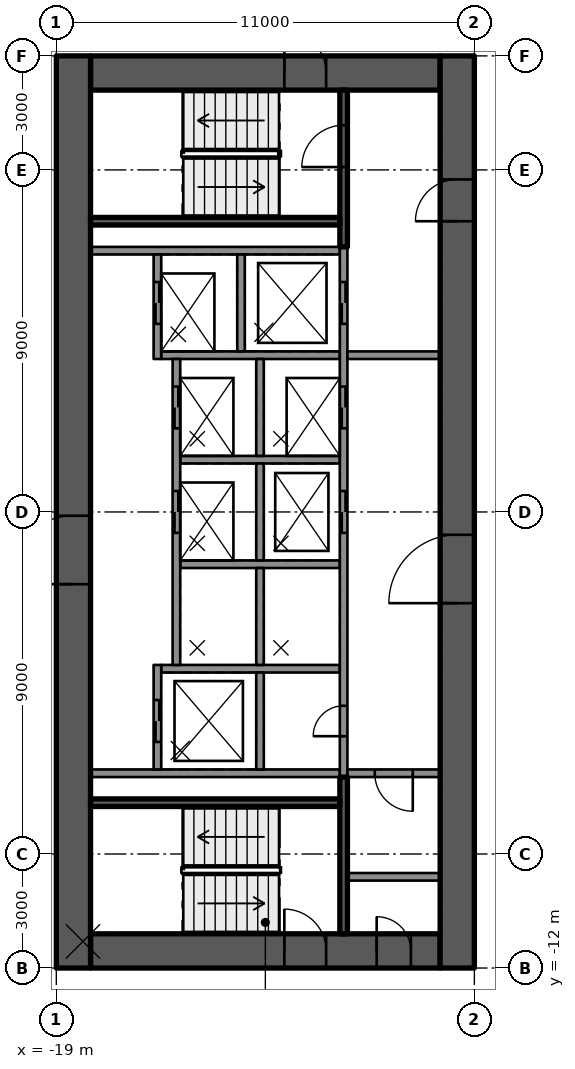
"""IFC4 building model, lengths in metres.
Left out: names, types, materials, properties, quantities, classifications, styles, units other than length and angle.
Written with IfcOpenShell. Run it as: python <this file> out.ifc"""

import sys

from ifc_helpers import new_model, si_unit, direction, frame, frame_2d, origin, place, context, subcontext, project, spatial, rectangle, extrude, element, fill, save


model = new_model("IFC4")
c1 = context("Model", 3, precision=1e-05, world=origin(), true_north=direction((0.0, 1.0)))
c2 = subcontext(c1, "Body", "Model", "MODEL_VIEW")
j1 = project(units=[si_unit("LENGTHUNIT", "METRE"), si_unit("PLANEANGLEUNIT", "RADIAN")], contexts=[c1])
p1 = place(None, origin())
s1 = spatial("IfcSite", under=j1, at=p1, CompositionType="ELEMENT")
p2 = place(p1, origin())
s2 = spatial("IfcBuilding", under=s1, at=p2, CompositionType="ELEMENT")
p3 = place(p2, frame((0.0, 0.0, 91.2)))
s3 = spatial("IfcBuildingStorey", under=s2, at=p3, CompositionType="ELEMENT", Elevation=91.2)
p4 = place(p3, frame((-18.1, 11.55, 0.0), z_axis=(0.0, 0.0, 1.0), x_axis=(1.0, 0.0, 0.0)))
e1 = element("IfcWall", 1, at=p4, inside=s3, PredefinedType="SHEAR", context=c2, shape_type="SweptSolid", body=[
    extrude(rectangle(XDim=9.2, YDim=0.9, at=frame_2d((4.6, 0.0))), origin(), (0.0, 0.0, 1.0), 3.5),
])
p5 = place(p4, frame((5.1, 0.0, 0.0)))
e2 = element("IfcOpeningElement", 2, at=p5, cuts=e1, PredefinedType="OPENING", context=c2, shape_type="SweptSolid", body=[
    extrude(rectangle(XDim=1.1, YDim=2.1, at=frame_2d((0.55, 1.05))), frame((0.0, 0.46, 0.0), z_axis=(0.0, -1.0, 0.0), x_axis=(1.0, 0.0, 0.0)), (0.0, 0.0, 1.0), 0.92),
])
p6 = place(p3, frame((-18.1, -11.55, 0.0), z_axis=(0.0, 0.0, 1.0), x_axis=(1.0, 0.0, 0.0)))
e3 = element("IfcWall", 3, at=p6, inside=s3, PredefinedType="SHEAR", context=c2, shape_type="SweptSolid", body=[
    extrude(rectangle(XDim=9.2, YDim=0.9, at=frame_2d((4.6, 0.0))), origin(), (0.0, 0.0, 1.0), 3.5),
])
p7 = place(p6, frame((5.1, 0.0, 0.0)))
e4 = element("IfcOpeningElement", 4, at=p7, cuts=e3, PredefinedType="OPENING", context=c2, shape_type="SweptSolid", body=[
    extrude(rectangle(XDim=1.1, YDim=2.1, at=frame_2d((0.55, 1.05))), frame((0.0, 0.46, 0.0), z_axis=(0.0, -1.0, 0.0), x_axis=(1.0, 0.0, 0.0)), (0.0, 0.0, 1.0), 0.92),
])
p8 = place(p6, frame((7.53, 0.0, 0.0)))
e5 = element("IfcOpeningElement", 5, at=p8, cuts=e3, PredefinedType="OPENING", context=c2, shape_type="SweptSolid", body=[
    extrude(rectangle(XDim=0.9, YDim=2.1, at=frame_2d((0.45, 1.05))), frame((0.0, 0.46, 0.0), z_axis=(0.0, -1.0, 0.0), x_axis=(1.0, 0.0, 0.0)), (0.0, 0.0, 1.0), 0.92),
])
p9 = place(p3, frame((-18.55, -12.0, 0.0), z_axis=(0.0, 0.0, 1.0), x_axis=(0.0, 1.0, 0.0)))
e6 = element("IfcWall", 6, at=p9, inside=s3, PredefinedType="SHEAR", context=c2, shape_type="SweptSolid", body=[
    extrude(rectangle(XDim=24.0, YDim=0.9, at=frame_2d((12.0, 0.0))), origin(), (0.0, 0.0, 1.0), 3.5),
])
p10 = place(p9, frame((10.1, 0.0, 0.0)))
e7 = element("IfcOpeningElement", 7, at=p10, cuts=e6, PredefinedType="OPENING", context=c2, shape_type="SweptSolid", body=[
    extrude(rectangle(XDim=1.8, YDim=2.1, at=frame_2d((0.9, 1.05))), frame((0.0, 0.46, 0.0), z_axis=(0.0, -1.0, 0.0), x_axis=(1.0, 0.0, 0.0)), (0.0, 0.0, 1.0), 0.92),
])
p11 = place(p3, frame((-8.45, -12.0, 0.0), z_axis=(0.0, 0.0, 1.0), x_axis=(0.0, 1.0, 0.0)))
e8 = element("IfcWall", 8, at=p11, inside=s3, PredefinedType="SHEAR", context=c2, shape_type="SweptSolid", body=[
    extrude(rectangle(XDim=24.0, YDim=0.9, at=frame_2d((12.0, 0.0))), origin(), (0.0, 0.0, 1.0), 3.5),
])
p12 = place(p11, frame((9.6, 0.0, 0.0)))
e9 = element("IfcOpeningElement", 9, at=p12, cuts=e8, PredefinedType="OPENING", context=c2, shape_type="SweptSolid", body=[
    extrude(rectangle(XDim=1.8, YDim=2.1, at=frame_2d((0.9, 1.05))), frame((0.0, 0.46, 0.0), z_axis=(0.0, -1.0, 0.0), x_axis=(1.0, 0.0, 0.0)), (0.0, 0.0, 1.0), 0.92),
])
p13 = place(p11, frame((19.65, 0.0, 0.0)))
e10 = element("IfcOpeningElement", 10, at=p13, cuts=e8, PredefinedType="OPENING", context=c2, shape_type="SweptSolid", body=[
    extrude(rectangle(XDim=1.1, YDim=2.1, at=frame_2d((0.55, 1.05))), frame((0.0, 0.46, 0.0), z_axis=(0.0, -1.0, 0.0), x_axis=(1.0, 0.0, 0.0)), (0.0, 0.0, 1.0), 0.92),
])
for number, where, z_axis, x_axis in (
    (11, (-11.54, 6.875, 0.0), (0.0, 0.0, 1.0), (-1.0, 0.0, 0.0)),
    (12, (-11.54, -6.875, 0.0), (0.0, 0.0, 1.0), (-1.0, 0.0, 0.0)),
):
    element("IfcWall", number, at=place(p3, frame(where, z_axis=z_axis, x_axis=x_axis)), inside=s3, PredefinedType="SOLIDWALL", context=c2, shape_type="SweptSolid", body=[
        extrude(rectangle(XDim=6.56, YDim=0.2, at=frame_2d((3.28, 0.0))), origin(), (0.0, 0.0, 1.0), 3.09),
    ])
p14 = place(p3, frame((-11.54, -4.125, 0.0), z_axis=(0.0, 0.0, 1.0), x_axis=(-1.0, 0.0, 0.0)))
e13 = element("IfcWall", 13, at=p14, inside=s3, PredefinedType="SOLIDWALL", context=c2, shape_type="SweptSolid", body=[
    extrude(rectangle(XDim=4.7, YDim=0.2, at=frame_2d((2.35, 0.0))), origin(), (0.0, 0.0, 1.0), 3.09),
])
for number, where, z_axis, x_axis in (
    (14, (-11.54, -1.375, 0.0), (0.0, 0.0, 1.0), (-1.0, 0.0, 0.0)),
    (15, (-11.54, 1.375, 0.0), (0.0, 0.0, 1.0), (-1.0, 0.0, 0.0)),
):
    element("IfcWall", number, at=place(p3, frame(where, z_axis=z_axis, x_axis=x_axis)), inside=s3, PredefinedType="SOLIDWALL", context=c2, shape_type="SweptSolid", body=[
        extrude(rectangle(XDim=4.2, YDim=0.2, at=frame_2d((2.1, 0.0))), origin(), (0.0, 0.0, 1.0), 3.09),
    ])
p15 = place(p3, frame((-11.54, 4.125, 0.0), z_axis=(0.0, 0.0, 1.0), x_axis=(-1.0, 0.0, 0.0)))
e16 = element("IfcWall", 16, at=p15, inside=s3, PredefinedType="SOLIDWALL", context=c2, shape_type="SweptSolid", body=[
    extrude(rectangle(XDim=4.7, YDim=0.2, at=frame_2d((2.35, 0.0))), origin(), (0.0, 0.0, 1.0), 3.09),
])
p16 = place(p3, frame((-11.44, -6.975, 0.0), z_axis=(0.0, 0.0, 1.0), x_axis=(0.0, 1.0, 0.0)))
e17 = element("IfcWall", 17, at=p16, inside=s3, PredefinedType="SOLIDWALL", context=c2, shape_type="SweptSolid", body=[
    extrude(rectangle(XDim=13.95, YDim=0.2, at=frame_2d((6.975, 0.0))), origin(), (0.0, 0.0, 1.0), 3.09),
])
p17 = place(p16, frame((6.425, 0.0, 0.0)))
e18 = element("IfcOpeningElement", 18, at=p17, cuts=e17, PredefinedType="OPENING", context=c2, shape_type="SweptSolid", body=[
    extrude(rectangle(XDim=1.1, YDim=2.1, at=frame_2d((0.55, 1.05))), frame((0.0, 0.11, 0.0), z_axis=(0.0, -1.0, 0.0), x_axis=(1.0, 0.0, 0.0)), (0.0, 0.0, 1.0), 0.22),
])
p18 = place(p16, frame((9.175, 0.0, 0.0)))
e19 = element("IfcOpeningElement", 19, at=p18, cuts=e17, PredefinedType="OPENING", context=c2, shape_type="SweptSolid", body=[
    extrude(rectangle(XDim=1.1, YDim=2.1, at=frame_2d((0.55, 1.05))), frame((0.0, 0.11, 0.0), z_axis=(0.0, -1.0, 0.0), x_axis=(1.0, 0.0, 0.0)), (0.0, 0.0, 1.0), 0.22),
])
p19 = place(p16, frame((11.925, 0.0, 0.0)))
e20 = element("IfcOpeningElement", 20, at=p19, cuts=e17, PredefinedType="OPENING", context=c2, shape_type="SweptSolid", body=[
    extrude(rectangle(XDim=1.1, YDim=2.1, at=frame_2d((0.55, 1.05))), frame((0.0, 0.11, 0.0), z_axis=(0.0, -1.0, 0.0), x_axis=(1.0, 0.0, 0.0)), (0.0, 0.0, 1.0), 0.22),
])
p20 = place(p16, frame((1.075, 0.0, 0.0)))
e21 = element("IfcOpeningElement", 21, at=p20, cuts=e17, PredefinedType="OPENING", context=c2, shape_type="SweptSolid", body=[
    extrude(rectangle(XDim=0.8, YDim=2.1, at=frame_2d((0.4, 1.05))), frame((0.0, 0.11, 0.0), z_axis=(0.0, -1.0, 0.0), x_axis=(1.0, 0.0, 0.0)), (0.0, 0.0, 1.0), 0.22),
])
for number, where, z_axis, x_axis in (
    (22, (-13.64, -6.775, 0.0), (0.0, 0.0, 1.0), (0.0, 1.0, 0.0)),
    (23, (-13.64, -4.025, 0.0), (0.0, 0.0, 1.0), (0.0, 1.0, 0.0)),
    (24, (-13.64, -1.275, 0.0), (0.0, 0.0, 1.0), (0.0, 1.0, 0.0)),
    (25, (-13.64, 1.475, 0.0), (0.0, 0.0, 1.0), (0.0, 1.0, 0.0)),
    (26, (-14.14, 4.225, 0.0), (0.0, 0.0, 1.0), (0.0, 1.0, 0.0)),
):
    element("IfcWall", number, at=place(p3, frame(where, z_axis=z_axis, x_axis=x_axis)), inside=s3, PredefinedType="SOLIDWALL", context=c2, shape_type="SweptSolid", body=[
        extrude(rectangle(XDim=2.55, YDim=0.2, at=frame_2d((1.275, 0.0))), origin(), (0.0, 0.0, 1.0), 3.09),
    ])
p21 = place(p3, frame((-16.34, -6.775, 0.0), z_axis=(0.0, 0.0, 1.0), x_axis=(0.0, 1.0, 0.0)))
e27 = element("IfcWall", 27, at=p21, inside=s3, PredefinedType="SOLIDWALL", context=c2, shape_type="SweptSolid", body=[
    extrude(rectangle(XDim=2.75, YDim=0.2, at=frame_2d((1.375, 0.0))), origin(), (0.0, 0.0, 1.0), 3.09),
])
p22 = place(p21, frame((0.725, 0.0, 0.0)))
e28 = element("IfcOpeningElement", 28, at=p22, cuts=e27, PredefinedType="OPENING", context=c2, shape_type="SweptSolid", body=[
    extrude(rectangle(XDim=1.1, YDim=2.1, at=frame_2d((0.55, 1.05))), frame((0.0, 0.11, 0.0), z_axis=(0.0, -1.0, 0.0), x_axis=(1.0, 0.0, 0.0)), (0.0, 0.0, 1.0), 0.22),
])
p23 = place(p3, frame((-15.84, -4.025, 0.0), z_axis=(0.0, 0.0, 1.0), x_axis=(0.0, 1.0, 0.0)))
e29 = element("IfcWall", 29, at=p23, inside=s3, PredefinedType="SOLIDWALL", context=c2, shape_type="SweptSolid", body=[
    extrude(rectangle(XDim=8.05, YDim=0.2, at=frame_2d((4.025, 0.0))), origin(), (0.0, 0.0, 1.0), 3.09),
])
p24 = place(p23, frame((3.475, 0.0, 0.0)))
e30 = element("IfcOpeningElement", 30, at=p24, cuts=e29, PredefinedType="OPENING", context=c2, shape_type="SweptSolid", body=[
    extrude(rectangle(XDim=1.1, YDim=2.1, at=frame_2d((0.55, 1.05))), frame((0.0, 0.11, 0.0), z_axis=(0.0, -1.0, 0.0), x_axis=(1.0, 0.0, 0.0)), (0.0, 0.0, 1.0), 0.22),
])
p25 = place(p23, frame((6.225, 0.0, 0.0)))
e31 = element("IfcOpeningElement", 31, at=p25, cuts=e29, PredefinedType="OPENING", context=c2, shape_type="SweptSolid", body=[
    extrude(rectangle(XDim=1.1, YDim=2.1, at=frame_2d((0.55, 1.05))), frame((0.0, 0.11, 0.0), z_axis=(0.0, -1.0, 0.0), x_axis=(1.0, 0.0, 0.0)), (0.0, 0.0, 1.0), 0.22),
])
p26 = place(p3, frame((-16.34, 4.025, 0.0), z_axis=(0.0, 0.0, 1.0), x_axis=(0.0, 1.0, 0.0)))
e32 = element("IfcWall", 32, at=p26, inside=s3, PredefinedType="SOLIDWALL", context=c2, shape_type="SweptSolid", body=[
    extrude(rectangle(XDim=2.75, YDim=0.2, at=frame_2d((1.375, 0.0))), origin(), (0.0, 0.0, 1.0), 3.09),
])
p27 = place(p26, frame((0.925, 0.0, 0.0)))
e33 = element("IfcOpeningElement", 33, at=p27, cuts=e32, PredefinedType="OPENING", context=c2, shape_type="SweptSolid", body=[
    extrude(rectangle(XDim=1.1, YDim=2.1, at=frame_2d((0.55, 1.05))), frame((0.0, 0.11, 0.0), z_axis=(0.0, -1.0, 0.0), x_axis=(1.0, 0.0, 0.0)), (0.0, 0.0, 1.0), 0.22),
])
p28 = place(p3, frame((-11.44, 6.975, 0.0), z_axis=(0.0, 0.0, 1.0), x_axis=(0.0, 1.0, 0.0)))
e34 = element("IfcWall", 34, at=p28, inside=s3, PredefinedType="SOLIDWALL", context=c2, shape_type="SweptSolid", body=[
    extrude(rectangle(XDim=4.125, YDim=0.2, at=frame_2d((2.062, 0.0))), origin(), (0.0, 0.0, 1.0), 3.09),
])
p29 = place(p28, frame((2.1, 0.0, 0.0)))
e35 = element("IfcOpeningElement", 35, at=p29, cuts=e34, PredefinedType="OPENING", context=c2, shape_type="SweptSolid", body=[
    extrude(rectangle(XDim=1.1, YDim=2.1, at=frame_2d((0.55, 1.05))), frame((0.0, 0.11, 0.0), z_axis=(0.0, -1.0, 0.0), x_axis=(1.0, 0.0, 0.0)), (0.0, 0.0, 1.0), 0.22),
])
p30 = place(p3, frame((-11.54, 7.65, 0.0), z_axis=(0.0, 0.0, 1.0), x_axis=(-1.0, 0.0, 0.0)))
e36 = element("IfcWall", 36, at=p30, inside=s3, PredefinedType="SOLIDWALL", context=c2, shape_type="SweptSolid", body=[
    extrude(rectangle(XDim=6.56, YDim=0.2, at=frame_2d((3.28, 0.0))), origin(), (0.0, 0.0, 1.0), 3.09),
])
p31 = place(p3, frame((-11.44, -11.1, 0.0), z_axis=(0.0, 0.0, 1.0), x_axis=(0.0, 1.0, 0.0)))
e37 = element("IfcWall", 37, at=p31, inside=s3, PredefinedType="SOLIDWALL", context=c2, shape_type="SweptSolid", body=[
    extrude(rectangle(XDim=4.125, YDim=0.2, at=frame_2d((2.062, 0.0))), origin(), (0.0, 0.0, 1.0), 3.09),
])
p32 = place(p3, frame((-11.54, -7.65, 0.0), z_axis=(0.0, 0.0, 1.0), x_axis=(-1.0, 0.0, 0.0)))
e38 = element("IfcWall", 38, at=p32, inside=s3, PredefinedType="SOLIDWALL", context=c2, shape_type="SweptSolid", body=[
    extrude(rectangle(XDim=6.56, YDim=0.2, at=frame_2d((3.28, 0.0))), origin(), (0.0, 0.0, 1.0), 3.09),
])
p33 = place(p3, frame((-8.9, 4.125, 0.0), z_axis=(0.0, 0.0, 1.0), x_axis=(-1.0, 0.0, 0.0)))
e39 = element("IfcWall", 39, at=p33, inside=s3, PredefinedType="PARTITIONING", context=c2, shape_type="SweptSolid", body=[
    extrude(rectangle(XDim=2.44, YDim=0.2, at=frame_2d((1.22, 0.0))), origin(), (0.0, 0.0, 1.0), 3.09),
])
p34 = place(p3, frame((-8.9, -6.875, 0.0), z_axis=(0.0, 0.0, 1.0), x_axis=(-1.0, 0.0, 0.0)))
e40 = element("IfcWall", 40, at=p34, inside=s3, PredefinedType="PARTITIONING", context=c2, shape_type="SweptSolid", body=[
    extrude(rectangle(XDim=2.44, YDim=0.2, at=frame_2d((1.22, 0.0))), origin(), (0.0, 0.0, 1.0), 3.09),
])
p35 = place(p34, frame((0.72, 0.0, 0.0)))
e41 = element("IfcOpeningElement", 41, at=p35, cuts=e40, PredefinedType="OPENING", context=c2, shape_type="SweptSolid", body=[
    extrude(rectangle(XDim=1.0, YDim=2.1, at=frame_2d((0.5, 1.05))), frame((0.0, 0.11, 0.0), z_axis=(0.0, -1.0, 0.0), x_axis=(1.0, 0.0, 0.0)), (0.0, 0.0, 1.0), 0.22),
])
p36 = place(p3, frame((-8.9, -9.6, 0.0), z_axis=(0.0, 0.0, 1.0), x_axis=(-1.0, 0.0, 0.0)))
e42 = element("IfcWall", 42, at=p36, inside=s3, PredefinedType="PARTITIONING", context=c2, shape_type="SweptSolid", body=[
    extrude(rectangle(XDim=2.44, YDim=0.2, at=frame_2d((1.22, 0.0))), origin(), (0.0, 0.0, 1.0), 3.09),
])
p37 = place(p22, origin())
e43 = element("IfcDoor", 43, at=p37, inside=s3, OperationType="DOUBLE_DOOR_SLIDING", PredefinedType="DOOR", context=c2, shape_type="SweptSolid", body=[
    extrude(rectangle(XDim=1.1, YDim=2.1, at=frame_2d((0.55, 1.05))), frame((0.0, 0.025, 0.0), z_axis=(0.0, -1.0, 0.0), x_axis=(1.0, 0.0, 0.0)), (0.0, 0.0, 1.0), 0.05),
])
fill(e28, e43)
p38 = place(p17, origin())
e44 = element("IfcDoor", 44, at=p38, inside=s3, OperationType="DOUBLE_DOOR_SLIDING", PredefinedType="DOOR", context=c2, shape_type="SweptSolid", body=[
    extrude(rectangle(XDim=1.1, YDim=2.1, at=frame_2d((0.55, 1.05))), frame((0.0, 0.025, 0.0), z_axis=(0.0, -1.0, 0.0), x_axis=(1.0, 0.0, 0.0)), (0.0, 0.0, 1.0), 0.05),
])
fill(e18, e44)
p39 = place(p24, origin())
e45 = element("IfcDoor", 45, at=p39, inside=s3, OperationType="DOUBLE_DOOR_SLIDING", PredefinedType="DOOR", context=c2, shape_type="SweptSolid", body=[
    extrude(rectangle(XDim=1.1, YDim=2.1, at=frame_2d((0.55, 1.05))), frame((0.0, 0.025, 0.0), z_axis=(0.0, -1.0, 0.0), x_axis=(1.0, 0.0, 0.0)), (0.0, 0.0, 1.0), 0.05),
])
fill(e30, e45)
p40 = place(p18, origin())
e46 = element("IfcDoor", 46, at=p40, inside=s3, OperationType="DOUBLE_DOOR_SLIDING", PredefinedType="DOOR", context=c2, shape_type="SweptSolid", body=[
    extrude(rectangle(XDim=1.1, YDim=2.1, at=frame_2d((0.55, 1.05))), frame((0.0, 0.025, 0.0), z_axis=(0.0, -1.0, 0.0), x_axis=(1.0, 0.0, 0.0)), (0.0, 0.0, 1.0), 0.05),
])
fill(e19, e46)
p41 = place(p25, origin())
e47 = element("IfcDoor", 47, at=p41, inside=s3, OperationType="DOUBLE_DOOR_SLIDING", PredefinedType="DOOR", context=c2, shape_type="SweptSolid", body=[
    extrude(rectangle(XDim=1.1, YDim=2.1, at=frame_2d((0.55, 1.05))), frame((0.0, 0.025, 0.0), z_axis=(0.0, -1.0, 0.0), x_axis=(1.0, 0.0, 0.0)), (0.0, 0.0, 1.0), 0.05),
])
fill(e31, e47)
p42 = place(p19, origin())
e48 = element("IfcDoor", 48, at=p42, inside=s3, OperationType="DOUBLE_DOOR_SLIDING", PredefinedType="DOOR", context=c2, shape_type="SweptSolid", body=[
    extrude(rectangle(XDim=1.1, YDim=2.1, at=frame_2d((0.55, 1.05))), frame((0.0, 0.025, 0.0), z_axis=(0.0, -1.0, 0.0), x_axis=(1.0, 0.0, 0.0)), (0.0, 0.0, 1.0), 0.05),
])
fill(e20, e48)
p43 = place(p27, origin())
e49 = element("IfcDoor", 49, at=p43, inside=s3, OperationType="DOUBLE_DOOR_SLIDING", PredefinedType="DOOR", context=c2, shape_type="SweptSolid", body=[
    extrude(rectangle(XDim=1.1, YDim=2.1, at=frame_2d((0.55, 1.05))), frame((0.0, 0.025, 0.0), z_axis=(0.0, -1.0, 0.0), x_axis=(1.0, 0.0, 0.0)), (0.0, 0.0, 1.0), 0.05),
])
fill(e33, e49)
p44 = place(p20, origin())
e50 = element("IfcDoor", 50, at=p44, inside=s3, OperationType="SINGLE_SWING_LEFT", PredefinedType="DOOR", context=c2, shape_type="SweptSolid", body=[
    extrude(rectangle(XDim=0.8, YDim=2.1, at=frame_2d((0.4, 1.05))), frame((0.0, 0.025, 0.0), z_axis=(0.0, -1.0, 0.0), x_axis=(1.0, 0.0, 0.0)), (0.0, 0.0, 1.0), 0.05),
])
fill(e21, e50)
p45 = place(p12, origin())
e51 = element("IfcDoor", 51, at=p45, inside=s3, OperationType="SINGLE_SWING_LEFT", PredefinedType="DOOR", context=c2, shape_type="SweptSolid", body=[
    extrude(rectangle(XDim=1.8, YDim=2.1, at=frame_2d((0.9, 1.05))), frame((0.0, 0.025, 0.0), z_axis=(0.0, -1.0, 0.0), x_axis=(1.0, 0.0, 0.0)), (0.0, 0.0, 1.0), 0.05),
])
fill(e9, e51)
p46 = place(p10, origin())
e52 = element("IfcDoor", 52, at=p46, inside=s3, OperationType="SINGLE_SWING_LEFT", PredefinedType="DOOR", context=c2, shape_type="SweptSolid", body=[
    extrude(rectangle(XDim=1.8, YDim=2.1, at=frame_2d((0.9, 1.05))), frame((0.0, 0.025, 0.0), z_axis=(0.0, -1.0, 0.0), x_axis=(1.0, 0.0, 0.0)), (0.0, 0.0, 1.0), 0.05),
])
fill(e7, e52)
p47 = place(p13, origin())
e53 = element("IfcDoor", 53, at=p47, inside=s3, OperationType="SINGLE_SWING_RIGHT", PredefinedType="DOOR", context=c2, shape_type="SweptSolid", body=[
    extrude(rectangle(XDim=1.1, YDim=2.1, at=frame_2d((0.55, 1.05))), frame((0.0, 0.025, 0.0), z_axis=(0.0, -1.0, 0.0), x_axis=(1.0, 0.0, 0.0)), (0.0, 0.0, 1.0), 0.05),
])
fill(e10, e53)
p48 = place(p5, origin())
e54 = element("IfcDoor", 54, at=p48, inside=s3, OperationType="SINGLE_SWING_RIGHT", PredefinedType="DOOR", context=c2, shape_type="SweptSolid", body=[
    extrude(rectangle(XDim=1.1, YDim=2.1, at=frame_2d((0.55, 1.05))), frame((0.0, 0.025, 0.0), z_axis=(0.0, -1.0, 0.0), x_axis=(1.0, 0.0, 0.0)), (0.0, 0.0, 1.0), 0.05),
])
fill(e2, e54)
p49 = place(p7, origin())
e55 = element("IfcDoor", 55, at=p49, inside=s3, OperationType="SINGLE_SWING_RIGHT", PredefinedType="DOOR", context=c2, shape_type="SweptSolid", body=[
    extrude(rectangle(XDim=1.1, YDim=2.1, at=frame_2d((0.55, 1.05))), frame((0.0, 0.025, 0.0), z_axis=(0.0, -1.0, 0.0), x_axis=(1.0, 0.0, 0.0)), (0.0, 0.0, 1.0), 0.05),
])
fill(e4, e55)
p50 = place(p29, origin())
e56 = element("IfcDoor", 56, at=p50, inside=s3, OperationType="SINGLE_SWING_RIGHT", PredefinedType="DOOR", context=c2, shape_type="SweptSolid", body=[
    extrude(rectangle(XDim=1.1, YDim=2.1, at=frame_2d((0.55, 1.05))), frame((0.0, 0.025, 0.0), z_axis=(0.0, -1.0, 0.0), x_axis=(1.0, 0.0, 0.0)), (0.0, 0.0, 1.0), 0.05),
])
fill(e35, e56)
p51 = place(p8, origin())
e57 = element("IfcDoor", 57, at=p51, inside=s3, OperationType="SINGLE_SWING_RIGHT", PredefinedType="DOOR", context=c2, shape_type="SweptSolid", body=[
    extrude(rectangle(XDim=0.9, YDim=2.1, at=frame_2d((0.45, 1.05))), frame((0.0, 0.025, 0.0), z_axis=(0.0, -1.0, 0.0), x_axis=(1.0, 0.0, 0.0)), (0.0, 0.0, 1.0), 0.05),
])
fill(e5, e57)
p52 = place(p35, origin())
e58 = element("IfcDoor", 58, at=p52, inside=s3, OperationType="SINGLE_SWING_RIGHT", PredefinedType="DOOR", context=c2, shape_type="SweptSolid", body=[
    extrude(rectangle(XDim=1.0, YDim=2.1, at=frame_2d((0.5, 1.05))), frame((0.0, 0.025, 0.0), z_axis=(0.0, -1.0, 0.0), x_axis=(1.0, 0.0, 0.0)), (0.0, 0.0, 1.0), 0.05),
])
fill(e41, e58)
save(model, sys.argv[1])
